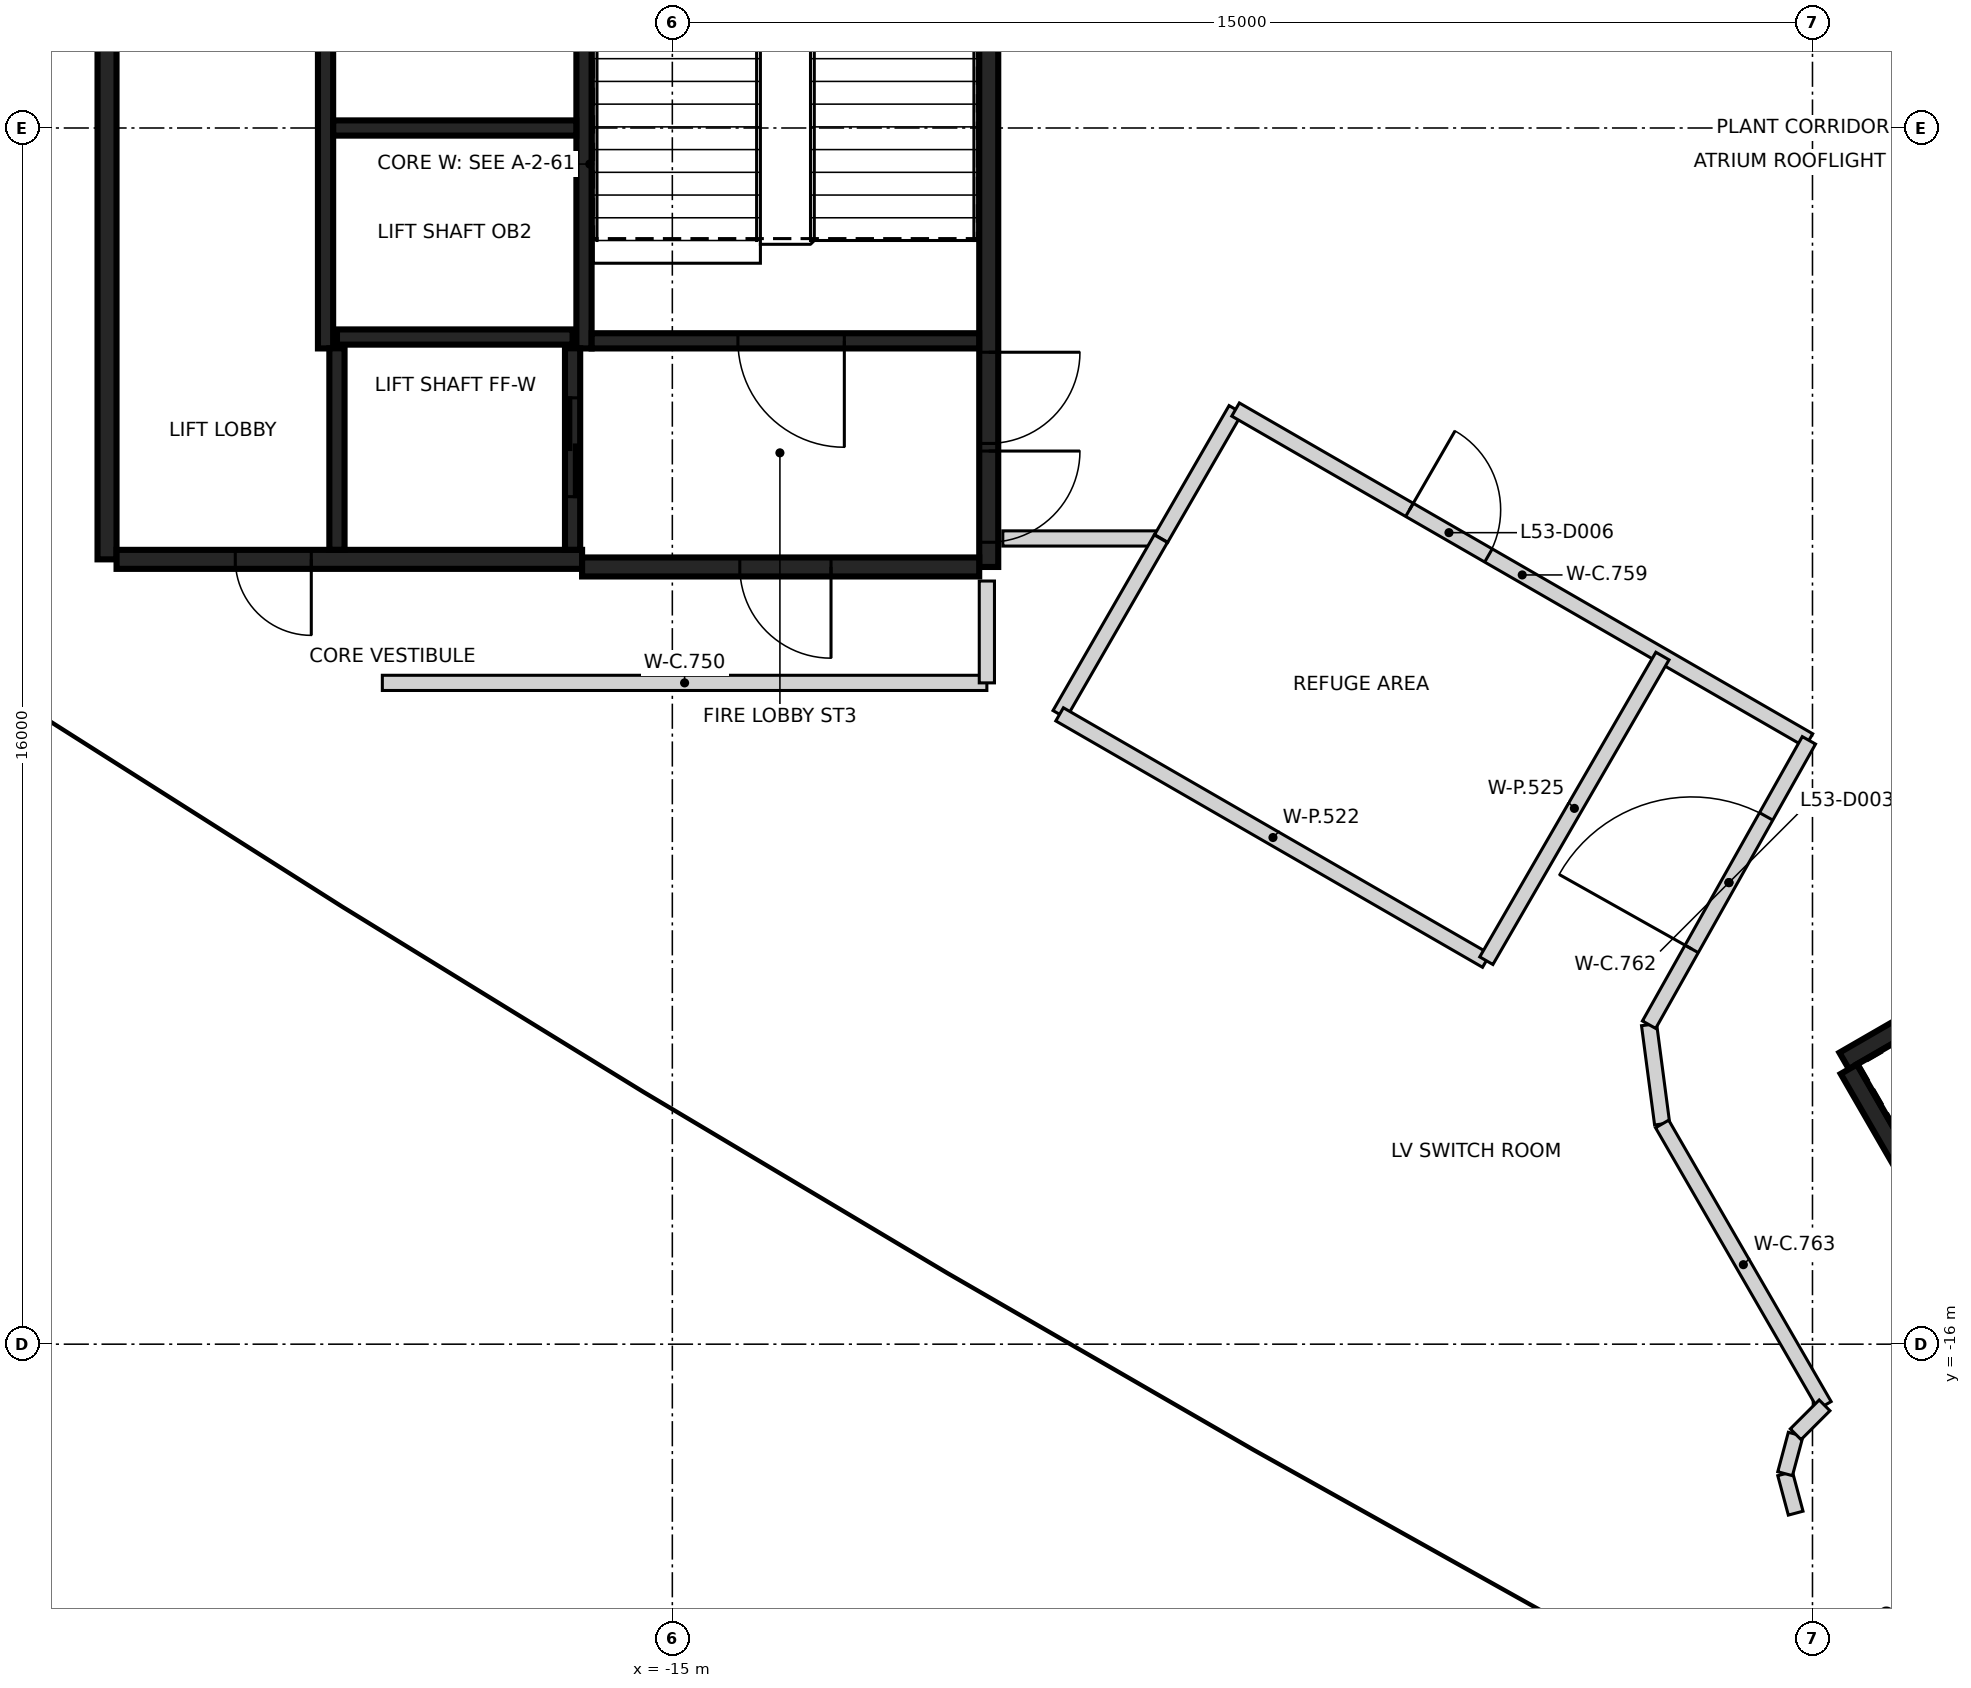
"""IFC4 building model, lengths in metres.
Left out: names, types, materials, properties, quantities, classifications, styles, units other than length and angle.
Written with IfcOpenShell. Run it as: python <this file> out.ifc"""

import sys

from ifc_helpers import new_model, si_unit, direction, frame, frame_2d, origin, origin_2d, place, context, subcontext, project, spatial, rectangle, extrude, element, fill, save


model = new_model("IFC4")
c1 = context("Model", 3, precision=1e-05, world=origin(), true_north=direction((0.0, 1.0)))
c2 = subcontext(c1, "Body", "Model", "MODEL_VIEW")
j1 = project(units=[si_unit("LENGTHUNIT", "METRE"), si_unit("PLANEANGLEUNIT", "RADIAN")], contexts=[c1])
p1 = place(None, origin())
s1 = spatial("IfcSite", under=j1, at=p1, CompositionType="ELEMENT")
p2 = place(p1, origin())
s2 = spatial("IfcBuilding", under=s1, at=p2, CompositionType="ELEMENT")
p3 = place(p2, frame((0.0, 0.0, 211.6)))
s3 = spatial("IfcBuildingStorey", under=s2, at=p3, CompositionType="ELEMENT", Elevation=211.6)
p4 = place(p3, frame((-10.837, 5.775, 0.0), z_axis=(0.0, 0.0, 1.0), x_axis=(0.0, -1.0, 0.0)))
e1 = element("IfcWall", 1, at=p4, inside=s3, PredefinedType="SHEAR", context=c2, shape_type="SweptSolid", body=[
    extrude(rectangle(XDim=11.55, YDim=0.25, at=frame_2d((5.775, 0.0))), origin(), (0.0, 0.0, 1.0), 4.45),
])
p5 = place(p4, frame((10.025, 0.0, 0.0)))
e2 = element("IfcOpeningElement", 2, at=p5, cuts=e1, PredefinedType="OPENING", context=c2, shape_type="SweptSolid", body=[
    extrude(rectangle(XDim=1.2, YDim=2.1, at=frame_2d((0.6, 1.05))), frame((0.0, 0.135, 0.0), z_axis=(0.0, -1.0, 0.0), x_axis=(1.0, 0.0, 0.0)), (0.0, 0.0, 1.0), 0.27),
])
p6 = place(p4, frame((8.725, 0.0, 0.0)))
e3 = element("IfcOpeningElement", 3, at=p6, cuts=e1, PredefinedType="OPENING", context=c2, shape_type="SweptSolid", body=[
    extrude(rectangle(XDim=1.2, YDim=2.1, at=frame_2d((0.6, 1.05))), frame((0.0, 0.135, 0.0), z_axis=(0.0, -1.0, 0.0), x_axis=(1.0, 0.0, 0.0)), (0.0, 0.0, 1.0), 0.27),
])
p7 = place(p3, frame((-22.437, -5.675, 0.0), z_axis=(0.0, 0.0, 1.0), x_axis=(0.0, 1.0, 0.0)))
e4 = element("IfcWall", 4, at=p7, inside=s3, PredefinedType="SHEAR", context=c2, shape_type="SweptSolid", body=[
    extrude(rectangle(XDim=8.75, YDim=0.25, at=frame_2d((4.375, 0.0))), origin(), (0.0, 0.0, 1.0), 4.45),
])
p8 = place(p3, frame((-16.187, -5.675, 0.0), z_axis=(0.0, 0.0, 1.0), x_axis=(-1.0, 0.0, 0.0)))
e5 = element("IfcWall", 5, at=p8, inside=s3, PredefinedType="SHEAR", context=c2, shape_type="SweptSolid", body=[
    extrude(rectangle(XDim=6.125, YDim=0.25, at=frame_2d((3.062, 0.0))), origin(), (0.0, 0.0, 1.0), 4.45),
])
p9 = place(p8, frame((3.563, 0.0, 0.0)))
e6 = element("IfcOpeningElement", 6, at=p9, cuts=e5, PredefinedType="OPENING", context=c2, shape_type="SweptSolid", body=[
    extrude(rectangle(XDim=1.0, YDim=2.1, at=frame_2d((0.5, 1.05))), frame((0.0, 0.135, 0.0), z_axis=(0.0, -1.0, 0.0), x_axis=(1.0, 0.0, 0.0)), (0.0, 0.0, 1.0), 0.27),
])
p10 = place(p3, frame((-10.963, -5.775, 0.0), z_axis=(0.0, 0.0, 1.0), x_axis=(-1.0, 0.0, 0.0)))
e7 = element("IfcWall", 7, at=p10, inside=s3, PredefinedType="SHEAR", context=c2, shape_type="SweptSolid", body=[
    extrude(rectangle(XDim=5.225, YDim=0.25, at=frame_2d((2.612, 0.0))), origin(), (0.0, 0.0, 1.0), 4.45),
])
p11 = place(p10, frame((1.95, 0.0, 0.0)))
e8 = element("IfcOpeningElement", 8, at=p11, cuts=e7, PredefinedType="OPENING", context=c2, shape_type="SweptSolid", body=[
    extrude(rectangle(XDim=1.2, YDim=2.1, at=frame_2d((0.6, 1.05))), frame((0.0, 0.135, 0.0), z_axis=(0.0, -1.0, 0.0), x_axis=(1.0, 0.0, 0.0)), (0.0, 0.0, 1.0), 0.27),
])
p12 = place(p3, frame((-16.162, 3.074, 0.0), z_axis=(0.0, 0.0, 1.0), x_axis=(0.0, -1.0, 0.0)))
e9 = element("IfcWall", 9, at=p12, inside=s3, PredefinedType="SHEAR", context=c2, shape_type="SweptSolid", body=[
    extrude(rectangle(XDim=5.974, YDim=0.2, at=frame_2d((2.987, 0.0))), origin(), (0.0, 0.0, 1.0), 4.45),
])
p13 = place(p3, frame((-19.562, -2.9, 0.0), z_axis=(0.0, 0.0, 1.0), x_axis=(0.0, 1.0, 0.0)))
e10 = element("IfcWall", 10, at=p13, inside=s3, PredefinedType="SHEAR", context=c2, shape_type="SweptSolid", body=[
    extrude(rectangle(XDim=6.1, YDim=0.2, at=frame_2d((3.05, 0.0))), origin(), (0.0, 0.0, 1.0), 4.45),
])
p14 = place(p3, frame((-10.963, -2.8, 0.0), z_axis=(0.0, 0.0, 1.0), x_axis=(-1.0, 0.0, 0.0)))
e11 = element("IfcWall", 11, at=p14, inside=s3, PredefinedType="SHEAR", context=c2, shape_type="SweptSolid", body=[
    extrude(rectangle(XDim=5.098, YDim=0.2, at=frame_2d((2.549, 0.0))), origin(), (0.0, 0.0, 1.0), 4.45),
])
p15 = place(p14, frame((1.774, 0.0, 0.0)))
e12 = element("IfcOpeningElement", 12, at=p15, cuts=e11, PredefinedType="OPENING", context=c2, shape_type="SweptSolid", body=[
    extrude(rectangle(XDim=1.4, YDim=2.1, at=frame_2d((0.7, 1.05))), frame((0.0, 0.11, 0.0), z_axis=(0.0, -1.0, 0.0), x_axis=(1.0, 0.0, 0.0)), (0.0, 0.0, 1.0), 0.22),
])
p16 = place(p3, frame((-16.263, 0.0, 0.0), z_axis=(0.0, 0.0, 1.0), x_axis=(-1.0, 0.0, 0.0)))
e13 = element("IfcWall", 13, at=p16, inside=s3, PredefinedType="SHEAR", context=c2, shape_type="SweptSolid", body=[
    extrude(rectangle(XDim=3.198, YDim=0.2, at=frame_2d((1.599, 0.0))), origin(), (0.0, 0.0, 1.0), 4.45),
])
p17 = place(p3, frame((-19.412, -2.75, 0.0), z_axis=(0.0, 0.0, 1.0), x_axis=(1.0, 0.0, 0.0)))
e14 = element("IfcWall", 14, at=p17, inside=s3, PredefinedType="SHEAR", context=c2, shape_type="SweptSolid", body=[
    extrude(rectangle(XDim=3.1, YDim=0.2, at=frame_2d((1.55, 0.0))), origin(), (0.0, 0.0, 1.0), 4.45),
])
p18 = place(p3, frame((-16.312, -2.898, 0.0), z_axis=(0.0, 0.0, 1.0), x_axis=(0.0, -1.0, 0.0)))
e15 = element("IfcWall", 15, at=p18, inside=s3, PredefinedType="SHEAR", context=c2, shape_type="SweptSolid", body=[
    extrude(rectangle(XDim=2.651, YDim=0.2, at=frame_2d((1.325, 0.0))), origin(), (0.0, 0.0, 1.0), 4.45),
])
p19 = place(p18, frame((0.652, 0.0, 0.0)))
e16 = element("IfcOpeningElement", 16, at=p19, cuts=e15, PredefinedType="OPENING", context=c2, shape_type="SweptSolid", body=[
    extrude(rectangle(XDim=1.3, YDim=2.1, at=frame_2d((0.65, 1.05))), frame((0.0, 0.11, 0.0), z_axis=(0.0, -1.0, 0.0), x_axis=(1.0, 0.0, 0.0)), (0.0, 0.0, 1.0), 0.22),
])
p20 = place(p3, frame((-19.412, -5.549, 0.0), z_axis=(0.0, 0.0, 1.0), x_axis=(0.0, 1.0, 0.0)))
e17 = element("IfcWall", 17, at=p20, inside=s3, PredefinedType="SHEAR", context=c2, shape_type="SweptSolid", body=[
    extrude(rectangle(XDim=2.651, YDim=0.2, at=frame_2d((1.325, 0.0))), origin(), (0.0, 0.0, 1.0), 4.45),
])
p21 = place(p3, frame((0.417, -12.273, 0.0), z_axis=(0.0, 0.0, 1.0), x_axis=(0.866021906294, 0.500006057782, 0.0)))
e18 = element("IfcWall", 18, at=p21, inside=s3, PredefinedType="SHEAR", context=c2, shape_type="SweptSolid", body=[
    extrude(rectangle(XDim=11.55, YDim=0.25, at=frame_2d((5.775, 0.0))), origin(), (0.0, 0.0, 1.0), 4.45),
])
p22 = place(p21, frame((10.025, 0.0, 0.0)))
e19 = element("IfcOpeningElement", 19, at=p22, cuts=e18, PredefinedType="OPENING", context=c2, shape_type="SweptSolid", body=[
    extrude(rectangle(XDim=1.2, YDim=2.1, at=frame_2d((0.6, 1.05))), frame((0.0, 0.135, 0.0), z_axis=(0.0, -1.0, 0.0), x_axis=(1.0, 0.0, 0.0)), (0.0, 0.0, 1.0), 0.27),
])
p23 = place(p21, frame((8.725, 0.0, 0.0)))
e20 = element("IfcOpeningElement", 20, at=p23, cuts=e18, PredefinedType="OPENING", context=c2, shape_type="SweptSolid", body=[
    extrude(rectangle(XDim=1.2, YDim=2.1, at=frame_2d((0.6, 1.05))), frame((0.0, 0.135, 0.0), z_axis=(0.0, -1.0, 0.0), x_axis=(1.0, 0.0, 0.0)), (0.0, 0.0, 1.0), 0.27),
])
p24 = place(p3, frame((3.235, -17.153, 0.0), z_axis=(0.0, 0.0, 1.0), x_axis=(-0.500008851346, 0.866020293397, 0.0)))
e21 = element("IfcWall", 21, at=p24, inside=s3, PredefinedType="SHEAR", context=c2, shape_type="SweptSolid", body=[
    extrude(rectangle(XDim=5.51, YDim=0.25, at=frame_2d((2.755, 0.0))), origin(), (0.0, 0.0, 1.0), 4.45),
])
p25 = place(p3, frame((-18.815, -7.3, 0.0), z_axis=(0.0, 0.0, 1.0), x_axis=(1.0, 0.0, 0.0)))
e22 = element("IfcWall", 22, at=p25, inside=s3, PredefinedType="PARTITIONING", context=c2, shape_type="SweptSolid", body=[
    extrude(rectangle(XDim=7.953, YDim=0.2, at=frame_2d((3.977, 0.0))), origin(), (0.0, 0.0, 1.0), 4.45),
])
p26 = place(p3, frame((-10.862, -7.3, 0.0), z_axis=(0.0, 0.0, 1.0), x_axis=(0.0, 1.0, 0.0)))
e23 = element("IfcWall", 23, at=p26, inside=s3, PredefinedType="PARTITIONING", context=c2, shape_type="SweptSolid", body=[
    extrude(rectangle(XDim=1.34, YDim=0.2, at=frame_2d((0.67, 0.0))), origin(), (0.0, 0.0, 1.0), 4.45),
])
p27 = place(p3, frame((-10.652, -5.4, 0.0), z_axis=(0.0, 0.0, 1.0), x_axis=(1.0, 0.0, 0.0)))
e24 = element("IfcWall", 24, at=p27, inside=s3, PredefinedType="PARTITIONING", context=c2, shape_type="SweptSolid", body=[
    extrude(rectangle(XDim=2.083, YDim=0.2, at=frame_2d((1.042, 0.0))), origin(), (0.0, 0.0, 1.0), 4.45),
])
p28 = place(p3, frame((-8.569, -5.4, 0.0), z_axis=(0.0, 0.0, 1.0), x_axis=(0.499862594797, 0.866104720183, 0.0)))
e25 = element("IfcWall", 25, at=p28, inside=s3, PredefinedType="PARTITIONING", context=c2, shape_type="SweptSolid", body=[
    extrude(rectangle(XDim=1.96, YDim=0.2, at=frame_2d((0.98, 0.0))), origin(), (0.0, 0.0, 1.0), 4.45),
])
p29 = place(p3, frame((-7.59, -3.704, 0.0), z_axis=(0.0, 0.0, 1.0), x_axis=(0.866168783239, -0.499751577228, 0.0)))
e26 = element("IfcWall", 26, at=p29, inside=s3, PredefinedType="PARTITIONING", context=c2, shape_type="SweptSolid", body=[
    extrude(rectangle(XDim=8.708, YDim=0.2, at=frame_2d((4.354, 0.0))), origin(), (0.0, 0.0, 1.0), 4.45),
])
p30 = place(p29, frame((2.641, 0.0, 0.0)))
e27 = element("IfcOpeningElement", 27, at=p30, cuts=e26, PredefinedType="OPENING", context=c2, shape_type="SweptSolid", body=[
    extrude(rectangle(XDim=1.2, YDim=2.1, at=frame_2d((0.6, 1.05))), frame((0.0, 0.11, 0.0), z_axis=(0.0, -1.0, 0.0), x_axis=(1.0, 0.0, 0.0)), (0.0, 0.0, 1.0), 0.22),
])
p31 = place(p3, frame((-2.15, -11.797, 0.0), z_axis=(0.0, 0.0, 1.0), x_axis=(0.130488075283, -0.991449878818, 0.0)))
e28 = element("IfcWall", 28, at=p31, inside=s3, PredefinedType="PARTITIONING", context=c2, shape_type="SweptSolid", body=[
    extrude(rectangle(XDim=1.317, YDim=0.2, at=frame_2d((0.659, 0.0))), origin(), (0.0, 0.0, 1.0), 4.45),
])
p32 = place(p3, frame((-2.15, -11.797, 0.0), z_axis=(0.0, 0.0, 1.0), x_axis=(0.489969517534, 0.871739566549, 0.0)))
e29 = element("IfcWall", 29, at=p32, inside=s3, PredefinedType="PARTITIONING", context=c2, shape_type="SweptSolid", body=[
    extrude(rectangle(XDim=4.292, YDim=0.2, at=frame_2d((2.146, 0.0))), origin(), (0.0, 0.0, 1.0), 4.45),
])
p33 = place(p32, frame((1.144, 0.0, 0.0)))
e30 = element("IfcOpeningElement", 30, at=p33, cuts=e29, PredefinedType="OPENING", context=c2, shape_type="SweptSolid", body=[
    extrude(rectangle(XDim=2.0, YDim=2.1, at=frame_2d((1.0, 1.05))), frame((0.0, 0.11, 0.0), z_axis=(0.0, -1.0, 0.0), x_axis=(1.0, 0.0, 0.0)), (0.0, 0.0, 1.0), 0.22),
])
p34 = place(p3, frame((-1.978, -13.103, 0.0), z_axis=(0.0, 0.0, 1.0), x_axis=(0.49994164861, -0.866059090354, 0.0)))
e31 = element("IfcWall", 31, at=p34, inside=s3, PredefinedType="PARTITIONING", context=c2, shape_type="SweptSolid", body=[
    extrude(rectangle(XDim=4.274, YDim=0.2, at=frame_2d((2.137, 0.0))), origin(), (0.0, 0.0, 1.0), 4.45),
])
p35 = place(p3, frame((-0.36, -17.704, 0.0), z_axis=(0.0, 0.0, 1.0), x_axis=(0.259076858299, -0.965856708572, 0.0)))
e32 = element("IfcWall", 32, at=p35, inside=s3, PredefinedType="PARTITIONING", context=c2, shape_type="SweptSolid", body=[
    extrude(rectangle(XDim=0.537, YDim=0.2, at=frame_2d((0.269, 0.0))), origin(), (0.0, 0.0, 1.0), 4.45),
])
for number, where, z_axis, x_axis in (
    (33, (-0.36, -17.704, 0.0), (0.0, 0.0, 1.0), (0.259, 0.966, 0.0)),
    (34, (-0.221, -17.185, 0.0), (0.0, 0.0, 1.0), (0.707, 0.707, 0.0)),
):
    element("IfcWall", number, at=place(p3, frame(where, z_axis=z_axis, x_axis=x_axis)), inside=s3, PredefinedType="PARTITIONING", context=c2, shape_type="SweptSolid", body=[
        extrude(rectangle(XDim=0.537, YDim=0.2, at=frame_2d((0.269, 0.0))), origin(), (0.0, 0.0, 1.0), 4.45),
    ])
p36 = place(p3, frame((-9.905, -7.714, 0.0), z_axis=(0.0, 0.0, 1.0), x_axis=(0.499368495827, 0.866389696023, 0.0)))
e35 = element("IfcWall", 35, at=p36, inside=s3, PredefinedType="PARTITIONING", context=c2, shape_type="SweptSolid", body=[
    extrude(rectangle(XDim=2.667, YDim=0.2, at=frame_2d((1.334, 0.0))), origin(), (0.0, 0.0, 1.0), 4.45),
])
p37 = place(p3, frame((-9.905, -7.714, 0.0), z_axis=(0.0, 0.0, 1.0), x_axis=(0.866044474677, -0.49996696679, 0.0)))
e36 = element("IfcWall", 36, at=p37, inside=s3, PredefinedType="PARTITIONING", context=c2, shape_type="SweptSolid", body=[
    extrude(rectangle(XDim=6.482, YDim=0.2, at=frame_2d((3.241, 0.0))), origin(), (0.0, 0.0, 1.0), 4.45),
])
p38 = place(p3, frame((-4.291, -10.955, 0.0), z_axis=(0.0, 0.0, 1.0), x_axis=(0.500460335608, 0.86575946572, 0.0)))
e37 = element("IfcWall", 37, at=p38, inside=s3, PredefinedType="PARTITIONING", context=c2, shape_type="SweptSolid", body=[
    extrude(rectangle(XDim=4.63, YDim=0.2, at=frame_2d((2.315, 0.0))), origin(), (0.0, 0.0, 1.0), 4.45),
])
p39 = place(p3, frame((0.0, 0.0, -0.4)))
p40 = place(p39, origin())
p41 = place(p40, frame((0.0, 0.0, 0.35)))
e38 = element("IfcWindow", 38, at=p41, inside=s3, PartitioningType="SINGLE_PANEL", PredefinedType="SKYLIGHT", context=c2, shape_type="SweptSolid", body=[
    extrude(rectangle(XDim=7.95, YDim=4.96, at=origin_2d()), origin(), (0.0, 0.0, 1.0), 0.05),
])
p42 = place(p19, origin())
e39 = element("IfcDoor", 39, at=p42, inside=s3, OperationType="SLIDING_TO_LEFT", PredefinedType="DOOR", context=c2, shape_type="SweptSolid", body=[
    extrude(rectangle(XDim=1.3, YDim=2.1, at=frame_2d((0.65, 1.05))), frame((0.0, 0.025, 0.0), z_axis=(0.0, -1.0, 0.0), x_axis=(1.0, 0.0, 0.0)), (0.0, 0.0, 1.0), 0.05),
])
fill(e16, e39)
p43 = place(p9, origin())
e40 = element("IfcDoor", 40, at=p43, inside=s3, OperationType="SINGLE_SWING_LEFT", PredefinedType="DOOR", context=c2, shape_type="SweptSolid", body=[
    extrude(rectangle(XDim=1.0, YDim=2.1, at=frame_2d((0.5, 1.05))), frame((0.0, 0.025, 0.0), z_axis=(0.0, -1.0, 0.0), x_axis=(1.0, 0.0, 0.0)), (0.0, 0.0, 1.0), 0.05),
])
fill(e6, e40)
p44 = place(p5, origin())
e41 = element("IfcDoor", 41, at=p44, inside=s3, OperationType="SINGLE_SWING_LEFT", PredefinedType="DOOR", context=c2, shape_type="SweptSolid", body=[
    extrude(rectangle(XDim=1.2, YDim=2.1, at=frame_2d((0.6, 1.05))), frame((0.0, 0.025, 0.0), z_axis=(0.0, -1.0, 0.0), x_axis=(1.0, 0.0, 0.0)), (0.0, 0.0, 1.0), 0.05),
])
fill(e2, e41)
p45 = place(p6, origin())
e42 = element("IfcDoor", 42, at=p45, inside=s3, OperationType="SINGLE_SWING_RIGHT", PredefinedType="DOOR", context=c2, shape_type="SweptSolid", body=[
    extrude(rectangle(XDim=1.2, YDim=2.1, at=frame_2d((0.6, 1.05))), frame((0.0, 0.025, 0.0), z_axis=(0.0, -1.0, 0.0), x_axis=(1.0, 0.0, 0.0)), (0.0, 0.0, 1.0), 0.05),
])
fill(e3, e42)
p46 = place(p15, origin())
e43 = element("IfcDoor", 43, at=p46, inside=s3, OperationType="SINGLE_SWING_LEFT", PredefinedType="DOOR", context=c2, shape_type="SweptSolid", body=[
    extrude(rectangle(XDim=1.4, YDim=2.1, at=frame_2d((0.7, 1.05))), frame((0.0, 0.025, 0.0), z_axis=(0.0, -1.0, 0.0), x_axis=(1.0, 0.0, 0.0)), (0.0, 0.0, 1.0), 0.05),
])
fill(e12, e43)
p47 = place(p11, origin())
e44 = element("IfcDoor", 44, at=p47, inside=s3, OperationType="SINGLE_SWING_RIGHT", PredefinedType="DOOR", context=c2, shape_type="SweptSolid", body=[
    extrude(rectangle(XDim=1.2, YDim=2.1, at=frame_2d((0.6, 1.05))), frame((0.0, 0.025, 0.0), z_axis=(0.0, -1.0, 0.0), x_axis=(1.0, 0.0, 0.0)), (0.0, 0.0, 1.0), 0.05),
])
fill(e8, e44)
p48 = place(p33, origin())
e45 = element("IfcDoor", 45, at=p48, inside=s3, OperationType="DOUBLE_DOOR_SINGLE_SWING", PredefinedType="DOOR", context=c2, shape_type="SweptSolid", body=[
    extrude(rectangle(XDim=2.0, YDim=2.1, at=frame_2d((1.0, 1.05))), frame((0.0, 0.025, 0.0), z_axis=(0.0, -1.0, 0.0), x_axis=(1.0, 0.0, 0.0)), (0.0, 0.0, 1.0), 0.05),
])
fill(e30, e45)
p49 = place(p30, frame((1.2, 0.0, 0.0), z_axis=(0.0, 0.0, 1.0), x_axis=(-1.0, 0.0, 0.0)))
e46 = element("IfcDoor", 46, at=p49, inside=s3, OperationType="SINGLE_SWING_LEFT", PredefinedType="DOOR", context=c2, shape_type="SweptSolid", body=[
    extrude(rectangle(XDim=1.2, YDim=2.1, at=frame_2d((0.6, 1.05))), frame((0.0, 0.025, 0.0), z_axis=(0.0, -1.0, 0.0), x_axis=(1.0, 0.0, 0.0)), (0.0, 0.0, 1.0), 0.05),
])
fill(e27, e46)
save(model, sys.argv[1])
